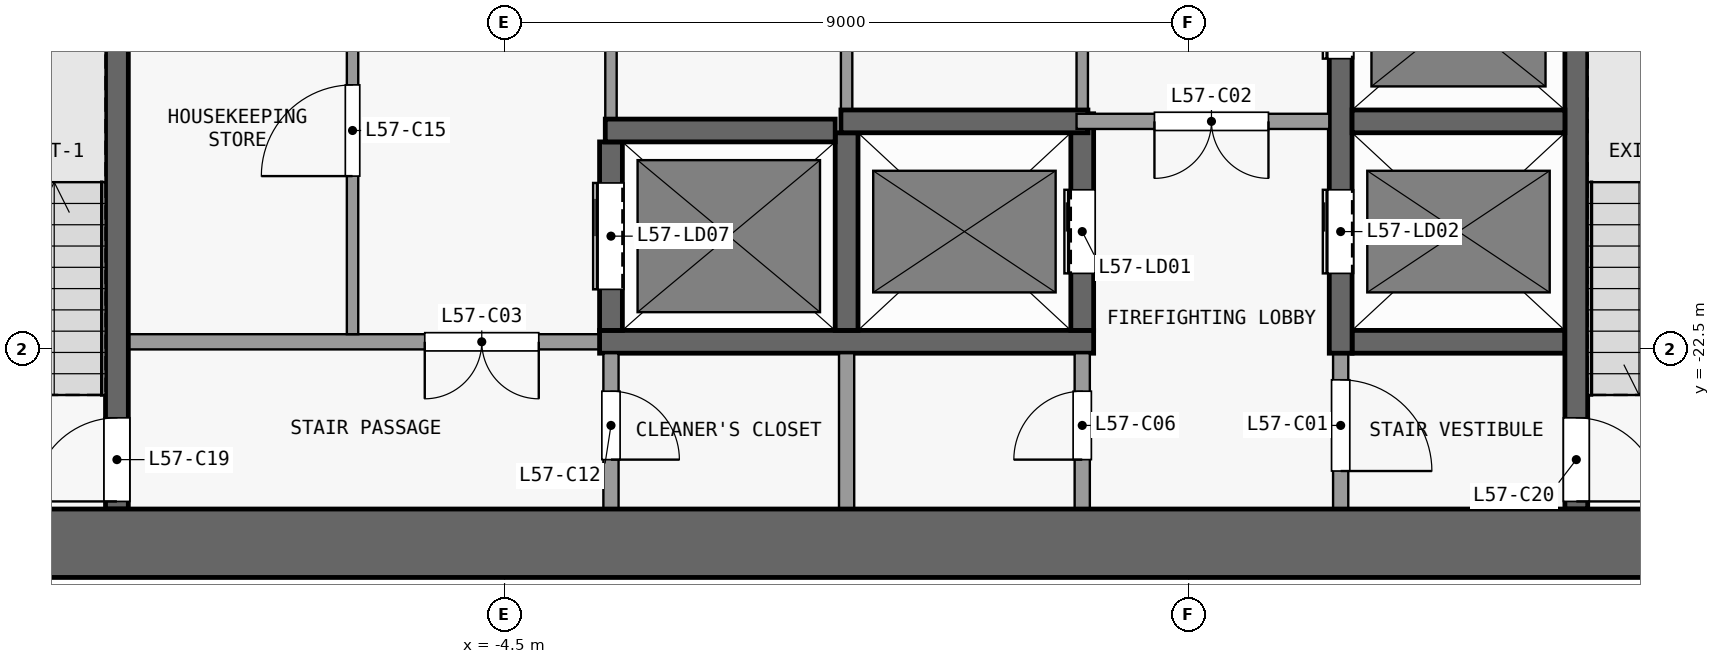
"""IFC4 building model, lengths in metres.
Left out: names, types, materials, properties, quantities, classifications, styles, units other than length and angle.
Written with IfcOpenShell. Run it as: python <this file> out.ifc"""

import sys

from ifc_helpers import new_model, si_unit, direction, frame, frame_2d, origin, place, context, subcontext, project, spatial, rectangle, extrude, element, fill, save


model = new_model("IFC4")
c1 = context("Model", 3, precision=1e-05, world=origin(), true_north=direction((0.0, 1.0)))
c2 = subcontext(c1, "Body", "Model", "MODEL_VIEW")
j1 = project(units=[si_unit("LENGTHUNIT", "METRE"), si_unit("PLANEANGLEUNIT", "RADIAN")], contexts=[c1])
p1 = place(None, origin())
s1 = spatial("IfcSite", under=j1, at=p1, CompositionType="ELEMENT")
p2 = place(p1, origin())
s2 = spatial("IfcBuilding", under=s1, at=p2, CompositionType="ELEMENT")
p3 = place(p2, frame((0.0, 0.0, 226.7)))
s3 = spatial("IfcBuildingStorey", under=s2, at=p3, CompositionType="ELEMENT", Elevation=226.7)
p4 = place(p3, frame((-13.2, -25.05, 0.0), z_axis=(0.0, 0.0, 1.0), x_axis=(1.0, 0.0, 0.0)))
e1 = element("IfcWall", 1, at=p4, inside=s3, PredefinedType="SHEAR", context=c2, shape_type="SweptSolid", body=[
    extrude(rectangle(XDim=26.4, YDim=0.9, at=frame_2d((13.2, 0.0))), origin(), (0.0, 0.0, 1.0), 3.3),
])
p5 = place(p3, frame((-3.25, -22.4, 0.0), z_axis=(0.0, 0.0, 1.0), x_axis=(-1.0, 0.0, 0.0)))
e2 = element("IfcWall", 2, at=p5, inside=s3, PredefinedType="PARTITIONING", context=c2, shape_type="SweptSolid", body=[
    extrude(rectangle(XDim=6.2, YDim=0.2, at=frame_2d((3.1, 0.0))), origin(), (0.0, 0.0, 1.0), 3.3),
])
p6 = place(p5, frame((0.8, 0.0, 0.0)))
e3 = element("IfcOpeningElement", 3, at=p6, cuts=e2, PredefinedType="OPENING", context=c2, shape_type="SweptSolid", body=[
    extrude(rectangle(XDim=1.5, YDim=2.1, at=frame_2d((0.75, 1.05))), frame((0.0, 0.11, 0.0), z_axis=(0.0, -1.0, 0.0), x_axis=(1.0, 0.0, 0.0)), (0.0, 0.0, 1.0), 0.22),
])
p7 = place(p3, frame((-3.25, -22.4, 0.0), z_axis=(0.0, 0.0, 1.0), x_axis=(1.0, 0.0, 0.0)))
e4 = element("IfcWall", 4, at=p7, inside=s3, PredefinedType="SHEAR", context=c2, shape_type="SweptSolid", body=[
    extrude(rectangle(XDim=6.5, YDim=0.3, at=frame_2d((3.25, 0.0))), origin(), (0.0, 0.0, 1.0), 3.3),
])
p8 = place(p3, frame((6.65, -22.4, 0.0), z_axis=(0.0, 0.0, 1.0), x_axis=(1.0, 0.0, 0.0)))
e5 = element("IfcWall", 5, at=p8, inside=s3, PredefinedType="SHEAR", context=c2, shape_type="SweptSolid", body=[
    extrude(rectangle(XDim=2.8, YDim=0.3, at=frame_2d((1.4, 0.0))), origin(), (0.0, 0.0, 1.0), 3.3),
])
p9 = place(p3, frame((-3.175, -19.62, 0.0), z_axis=(0.0, 0.0, 1.0), x_axis=(1.0, 0.0, 0.0)))
e6 = element("IfcWall", 6, at=p9, inside=s3, PredefinedType="SHEAR", context=c2, shape_type="SweptSolid", body=[
    extrude(rectangle(XDim=3.025, YDim=0.3, at=frame_2d((1.513, 0.0))), origin(), (0.0, 0.0, 1.0), 3.3),
])
p10 = place(p3, frame((-0.075, -19.5, 0.0), z_axis=(0.0, 0.0, 1.0), x_axis=(1.0, 0.0, 0.0)))
e7 = element("IfcWall", 7, at=p10, inside=s3, PredefinedType="SHEAR", context=c2, shape_type="SweptSolid", body=[
    extrude(rectangle(XDim=3.25, YDim=0.3, at=frame_2d((1.625, 0.0))), origin(), (0.0, 0.0, 1.0), 3.3),
])
p11 = place(p3, frame((6.35, -19.5, 0.0), z_axis=(0.0, 0.0, 1.0), x_axis=(-1.0, 0.0, 0.0)))
e8 = element("IfcWall", 8, at=p11, inside=s3, PredefinedType="PARTITIONING", context=c2, shape_type="SweptSolid", body=[
    extrude(rectangle(XDim=3.325, YDim=0.2, at=frame_2d((1.663, 0.0))), origin(), (0.0, 0.0, 1.0), 3.3),
])
p12 = place(p11, frame((0.8, 0.0, 0.0)))
e9 = element("IfcOpeningElement", 9, at=p12, cuts=e8, PredefinedType="OPENING", context=c2, shape_type="SweptSolid", body=[
    extrude(rectangle(XDim=1.5, YDim=2.1, at=frame_2d((0.75, 1.05))), frame((0.0, 0.11, 0.0), z_axis=(0.0, -1.0, 0.0), x_axis=(1.0, 0.0, 0.0)), (0.0, 0.0, 1.0), 0.22),
])
p13 = place(p3, frame((6.65, -19.5, 0.0), z_axis=(0.0, 0.0, 1.0), x_axis=(1.0, 0.0, 0.0)))
e10 = element("IfcWall", 10, at=p13, inside=s3, PredefinedType="SHEAR", context=c2, shape_type="SweptSolid", body=[
    extrude(rectangle(XDim=2.8, YDim=0.3, at=frame_2d((1.4, 0.0))), origin(), (0.0, 0.0, 1.0), 3.3),
])
p14 = place(p3, frame((-9.6, -24.6, 0.0), z_axis=(0.0, 0.0, 1.0), x_axis=(0.0, 1.0, 0.0)))
e11 = element("IfcWall", 11, at=p14, inside=s3, PredefinedType="SHEAR", context=c2, shape_type="SweptSolid", body=[
    extrude(rectangle(XDim=7.7, YDim=0.3, at=frame_2d((3.85, 0.0))), origin(), (0.0, 0.0, 1.0), 3.3),
])
p15 = place(p14, frame((0.1, 0.0, 0.0)))
e12 = element("IfcOpeningElement", 12, at=p15, cuts=e11, PredefinedType="OPENING", context=c2, shape_type="SweptSolid", body=[
    extrude(rectangle(XDim=1.1, YDim=2.1, at=frame_2d((0.55, 1.05))), frame((0.0, 0.16, 0.0), z_axis=(0.0, -1.0, 0.0), x_axis=(1.0, 0.0, 0.0)), (0.0, 0.0, 1.0), 0.32),
])
p16 = place(p3, frame((-6.5, -22.3, 0.0), z_axis=(0.0, 0.0, 1.0), x_axis=(0.0, 1.0, 0.0)))
e13 = element("IfcWall", 13, at=p16, inside=s3, PredefinedType="PARTITIONING", context=c2, shape_type="SweptSolid", body=[
    extrude(rectangle(XDim=8.14, YDim=0.15, at=frame_2d((4.07, 0.0))), origin(), (0.0, 0.0, 1.0), 3.3),
])
p17 = place(p16, frame((2.08, 0.0, 0.0)))
e14 = element("IfcOpeningElement", 14, at=p17, cuts=e13, PredefinedType="OPENING", context=c2, shape_type="SweptSolid", body=[
    extrude(rectangle(XDim=1.2, YDim=2.1, at=frame_2d((0.6, 1.05))), frame((0.0, 0.085, 0.0), z_axis=(0.0, -1.0, 0.0), x_axis=(1.0, 0.0, 0.0)), (0.0, 0.0, 1.0), 0.17),
])
p18 = place(p16, frame((6.4, 0.0, 0.0)))
e15 = element("IfcOpeningElement", 15, at=p18, cuts=e13, PredefinedType="OPENING", context=c2, shape_type="SweptSolid", body=[
    extrude(rectangle(XDim=0.9, YDim=2.1, at=frame_2d((0.45, 1.05))), frame((0.0, 0.085, 0.0), z_axis=(0.0, -1.0, 0.0), x_axis=(1.0, 0.0, 0.0)), (0.0, 0.0, 1.0), 0.17),
])
p19 = place(p3, frame((-3.1, -22.55, 0.0), z_axis=(0.0, 0.0, 1.0), x_axis=(0.0, -1.0, 0.0)))
e16 = element("IfcWall", 16, at=p19, inside=s3, PredefinedType="PARTITIONING", context=c2, shape_type="SweptSolid", body=[
    extrude(rectangle(XDim=2.05, YDim=0.2, at=frame_2d((1.025, 0.0))), origin(), (0.0, 0.0, 1.0), 3.3),
])
p20 = place(p19, frame((0.5, 0.0, 0.0)))
e17 = element("IfcOpeningElement", 17, at=p20, cuts=e16, PredefinedType="OPENING", context=c2, shape_type="SweptSolid", body=[
    extrude(rectangle(XDim=0.9, YDim=2.1, at=frame_2d((0.45, 1.05))), frame((0.0, 0.11, 0.0), z_axis=(0.0, -1.0, 0.0), x_axis=(1.0, 0.0, 0.0)), (0.0, 0.0, 1.0), 0.22),
])
p21 = place(p3, frame((-3.1, -22.25, 0.0), z_axis=(0.0, 0.0, 1.0), x_axis=(0.0, 1.0, 0.0)))
e18 = element("IfcWall", 18, at=p21, inside=s3, PredefinedType="SHEAR", context=c2, shape_type="SweptSolid", body=[
    extrude(rectangle(XDim=2.48, YDim=0.3, at=frame_2d((1.24, 0.0))), origin(), (0.0, 0.0, 1.0), 3.3),
])
p22 = place(p21, frame((0.54, 0.0, 0.0)))
e19 = element("IfcOpeningElement", 19, at=p22, cuts=e18, PredefinedType="OPENING", context=c2, shape_type="SweptSolid", body=[
    extrude(rectangle(XDim=1.4, YDim=2.1, at=frame_2d((0.7, 1.05))), frame((0.0, 0.16, 0.0), z_axis=(0.0, -1.0, 0.0), x_axis=(1.0, 0.0, 0.0)), (0.0, 0.0, 1.0), 0.32),
])
p23 = place(p3, frame((-3.1, -8.5, 0.0), z_axis=(0.0, 0.0, 1.0), x_axis=(0.0, -1.0, 0.0)))
e20 = element("IfcWall", 20, at=p23, inside=s3, PredefinedType="PARTITIONING", context=c2, shape_type="SweptSolid", body=[
    extrude(rectangle(XDim=10.97, YDim=0.15, at=frame_2d((5.485, 0.0))), origin(), (0.0, 0.0, 1.0), 3.3),
])
p24 = place(p23, frame((4.96, 0.0, 0.0)))
e21 = element("IfcOpeningElement", 21, at=p24, cuts=e20, PredefinedType="OPENING", context=c2, shape_type="SweptSolid", body=[
    extrude(rectangle(XDim=1.2, YDim=2.1, at=frame_2d((0.6, 1.05))), frame((0.0, 0.085, 0.0), z_axis=(0.0, -1.0, 0.0), x_axis=(1.0, 0.0, 0.0)), (0.0, 0.0, 1.0), 0.17),
])
p25 = place(p3, frame((0.0, -24.6, 0.0), z_axis=(0.0, 0.0, 1.0), x_axis=(0.0, 1.0, 0.0)))
e22 = element("IfcWall", 22, at=p25, inside=s3, PredefinedType="PARTITIONING", context=c2, shape_type="SweptSolid", body=[
    extrude(rectangle(XDim=2.05, YDim=0.2, at=frame_2d((1.025, 0.0))), origin(), (0.0, 0.0, 1.0), 3.3),
])
p26 = place(p3, frame((0.0, -22.25, 0.0), z_axis=(0.0, 0.0, 1.0), x_axis=(0.0, 1.0, 0.0)))
e23 = element("IfcWall", 23, at=p26, inside=s3, PredefinedType="SHEAR", context=c2, shape_type="SweptSolid", body=[
    extrude(rectangle(XDim=2.6, YDim=0.3, at=frame_2d((1.3, 0.0))), origin(), (0.0, 0.0, 1.0), 3.3),
])
p27 = place(p3, frame((0.0, -19.35, 0.0), z_axis=(0.0, 0.0, 1.0), x_axis=(0.0, 1.0, 0.0)))
e24 = element("IfcWall", 24, at=p27, inside=s3, PredefinedType="PARTITIONING", context=c2, shape_type="SweptSolid", body=[
    extrude(rectangle(XDim=10.85, YDim=0.15, at=frame_2d((5.425, 0.0))), origin(), (0.0, 0.0, 1.0), 3.3),
])
p28 = place(p3, frame((3.1, -24.6, 0.0), z_axis=(0.0, 0.0, 1.0), x_axis=(0.0, 1.0, 0.0)))
e25 = element("IfcWall", 25, at=p28, inside=s3, PredefinedType="PARTITIONING", context=c2, shape_type="SweptSolid", body=[
    extrude(rectangle(XDim=2.05, YDim=0.2, at=frame_2d((1.025, 0.0))), origin(), (0.0, 0.0, 1.0), 3.3),
])
p29 = place(p28, frame((0.65, 0.0, 0.0)))
e26 = element("IfcOpeningElement", 26, at=p29, cuts=e25, PredefinedType="OPENING", context=c2, shape_type="SweptSolid", body=[
    extrude(rectangle(XDim=0.9, YDim=2.1, at=frame_2d((0.45, 1.05))), frame((0.0, 0.11, 0.0), z_axis=(0.0, -1.0, 0.0), x_axis=(1.0, 0.0, 0.0)), (0.0, 0.0, 1.0), 0.22),
])
p30 = place(p3, frame((3.1, -22.25, 0.0), z_axis=(0.0, 0.0, 1.0), x_axis=(0.0, 1.0, 0.0)))
e27 = element("IfcWall", 27, at=p30, inside=s3, PredefinedType="SHEAR", context=c2, shape_type="SweptSolid", body=[
    extrude(rectangle(XDim=2.85, YDim=0.3, at=frame_2d((1.425, 0.0))), origin(), (0.0, 0.0, 1.0), 3.3),
])
p31 = place(p30, frame((0.75, 0.0, 0.0)))
e28 = element("IfcOpeningElement", 28, at=p31, cuts=e27, PredefinedType="OPENING", context=c2, shape_type="SweptSolid", body=[
    extrude(rectangle(XDim=1.1, YDim=2.1, at=frame_2d((0.55, 1.05))), frame((0.0, 0.16, 0.0), z_axis=(0.0, -1.0, 0.0), x_axis=(1.0, 0.0, 0.0)), (0.0, 0.0, 1.0), 0.32),
])
p32 = place(p3, frame((3.1, -19.4, 0.0), z_axis=(0.0, 0.0, 1.0), x_axis=(0.0, 1.0, 0.0)))
e29 = element("IfcWall", 29, at=p32, inside=s3, PredefinedType="PARTITIONING", context=c2, shape_type="SweptSolid", body=[
    extrude(rectangle(XDim=10.9, YDim=0.15, at=frame_2d((5.45, 0.0))), origin(), (0.0, 0.0, 1.0), 3.3),
])
p33 = place(p32, frame((4.8, 0.0, 0.0)))
e30 = element("IfcOpeningElement", 30, at=p33, cuts=e29, PredefinedType="OPENING", context=c2, shape_type="SweptSolid", body=[
    extrude(rectangle(XDim=1.2, YDim=2.1, at=frame_2d((0.6, 1.05))), frame((0.0, 0.085, 0.0), z_axis=(0.0, -1.0, 0.0), x_axis=(1.0, 0.0, 0.0)), (0.0, 0.0, 1.0), 0.17),
])
p34 = place(p3, frame((6.5, -22.55, 0.0), z_axis=(0.0, 0.0, 1.0), x_axis=(0.0, -1.0, 0.0)))
e31 = element("IfcWall", 31, at=p34, inside=s3, PredefinedType="PARTITIONING", context=c2, shape_type="SweptSolid", body=[
    extrude(rectangle(XDim=2.05, YDim=0.2, at=frame_2d((1.025, 0.0))), origin(), (0.0, 0.0, 1.0), 3.3),
])
p35 = place(p34, frame((0.35, 0.0, 0.0)))
e32 = element("IfcOpeningElement", 32, at=p35, cuts=e31, PredefinedType="OPENING", context=c2, shape_type="SweptSolid", body=[
    extrude(rectangle(XDim=1.2, YDim=2.1, at=frame_2d((0.6, 1.05))), frame((0.0, 0.11, 0.0), z_axis=(0.0, -1.0, 0.0), x_axis=(1.0, 0.0, 0.0)), (0.0, 0.0, 1.0), 0.22),
])
p36 = place(p3, frame((6.5, -22.55, 0.0), z_axis=(0.0, 0.0, 1.0), x_axis=(0.0, 1.0, 0.0)))
e33 = element("IfcWall", 33, at=p36, inside=s3, PredefinedType="SHEAR", context=c2, shape_type="SweptSolid", body=[
    extrude(rectangle(XDim=14.05, YDim=0.3, at=frame_2d((7.025, 0.0))), origin(), (0.0, 0.0, 1.0), 3.3),
])
p37 = place(p36, frame((1.05, 0.0, 0.0)))
e34 = element("IfcOpeningElement", 34, at=p37, cuts=e33, PredefinedType="OPENING", context=c2, shape_type="SweptSolid", body=[
    extrude(rectangle(XDim=1.1, YDim=2.1, at=frame_2d((0.55, 1.05))), frame((0.0, 0.16, 0.0), z_axis=(0.0, -1.0, 0.0), x_axis=(1.0, 0.0, 0.0)), (0.0, 0.0, 1.0), 0.32),
])
p38 = place(p36, frame((3.875, 0.0, 0.0)))
e35 = element("IfcOpeningElement", 35, at=p38, cuts=e33, PredefinedType="OPENING", context=c2, shape_type="SweptSolid", body=[
    extrude(rectangle(XDim=1.1, YDim=2.1, at=frame_2d((0.55, 1.05))), frame((0.0, 0.16, 0.0), z_axis=(0.0, -1.0, 0.0), x_axis=(1.0, 0.0, 0.0)), (0.0, 0.0, 1.0), 0.32),
])
p39 = place(p36, frame((6.625, 0.0, 0.0)))
e36 = element("IfcOpeningElement", 36, at=p39, cuts=e33, PredefinedType="OPENING", context=c2, shape_type="SweptSolid", body=[
    extrude(rectangle(XDim=1.1, YDim=2.1, at=frame_2d((0.55, 1.05))), frame((0.0, 0.16, 0.0), z_axis=(0.0, -1.0, 0.0), x_axis=(1.0, 0.0, 0.0)), (0.0, 0.0, 1.0), 0.32),
])
p40 = place(p36, frame((9.375, 0.0, 0.0)))
e37 = element("IfcOpeningElement", 37, at=p40, cuts=e33, PredefinedType="OPENING", context=c2, shape_type="SweptSolid", body=[
    extrude(rectangle(XDim=1.1, YDim=2.1, at=frame_2d((0.55, 1.05))), frame((0.0, 0.16, 0.0), z_axis=(0.0, -1.0, 0.0), x_axis=(1.0, 0.0, 0.0)), (0.0, 0.0, 1.0), 0.32),
])
p41 = place(p36, frame((12.125, 0.0, 0.0)))
e38 = element("IfcOpeningElement", 38, at=p41, cuts=e33, PredefinedType="OPENING", context=c2, shape_type="SweptSolid", body=[
    extrude(rectangle(XDim=1.1, YDim=2.1, at=frame_2d((0.55, 1.05))), frame((0.0, 0.16, 0.0), z_axis=(0.0, -1.0, 0.0), x_axis=(1.0, 0.0, 0.0)), (0.0, 0.0, 1.0), 0.32),
])
p42 = place(p3, frame((9.6, -16.9, 0.0), z_axis=(0.0, 0.0, 1.0), x_axis=(0.0, -1.0, 0.0)))
e39 = element("IfcWall", 39, at=p42, inside=s3, PredefinedType="SHEAR", context=c2, shape_type="SweptSolid", body=[
    extrude(rectangle(XDim=7.7, YDim=0.3, at=frame_2d((3.85, 0.0))), origin(), (0.0, 0.0, 1.0), 3.3),
])
p43 = place(p42, frame((6.5, 0.0, 0.0)))
e40 = element("IfcOpeningElement", 40, at=p43, cuts=e39, PredefinedType="OPENING", context=c2, shape_type="SweptSolid", body=[
    extrude(rectangle(XDim=1.1, YDim=2.1, at=frame_2d((0.55, 1.05))), frame((0.0, 0.16, 0.0), z_axis=(0.0, -1.0, 0.0), x_axis=(1.0, 0.0, 0.0)), (0.0, 0.0, 1.0), 0.32),
])
p44 = place(p31, origin())
e41 = element("IfcDoor", 41, at=p44, inside=s3, OperationType="DOUBLE_DOOR_SLIDING", PredefinedType="DOOR", context=c2, shape_type="SweptSolid", body=[
    extrude(rectangle(XDim=1.1, YDim=2.1, at=frame_2d((0.55, 1.05))), frame((0.0, 0.025, 0.0), z_axis=(0.0, -1.0, 0.0), x_axis=(1.0, 0.0, 0.0)), (0.0, 0.0, 1.0), 0.05),
])
fill(e28, e41)
p45 = place(p37, origin())
e42 = element("IfcDoor", 42, at=p45, inside=s3, OperationType="DOUBLE_DOOR_SLIDING", PredefinedType="DOOR", context=c2, shape_type="SweptSolid", body=[
    extrude(rectangle(XDim=1.1, YDim=2.1, at=frame_2d((0.55, 1.05))), frame((0.0, 0.025, 0.0), z_axis=(0.0, -1.0, 0.0), x_axis=(1.0, 0.0, 0.0)), (0.0, 0.0, 1.0), 0.05),
])
fill(e34, e42)
p46 = place(p38, origin())
e43 = element("IfcDoor", 43, at=p46, inside=s3, OperationType="DOUBLE_DOOR_SLIDING", PredefinedType="DOOR", context=c2, shape_type="SweptSolid", body=[
    extrude(rectangle(XDim=1.1, YDim=2.1, at=frame_2d((0.55, 1.05))), frame((0.0, 0.025, 0.0), z_axis=(0.0, -1.0, 0.0), x_axis=(1.0, 0.0, 0.0)), (0.0, 0.0, 1.0), 0.05),
])
fill(e35, e43)
p47 = place(p22, origin())
e44 = element("IfcDoor", 44, at=p47, inside=s3, OperationType="DOUBLE_DOOR_SLIDING", PredefinedType="DOOR", context=c2, shape_type="SweptSolid", body=[
    extrude(rectangle(XDim=1.4, YDim=2.1, at=frame_2d((0.7, 1.05))), frame((0.0, 0.025, 0.0), z_axis=(0.0, -1.0, 0.0), x_axis=(1.0, 0.0, 0.0)), (0.0, 0.0, 1.0), 0.05),
])
fill(e19, e44)
p48 = place(p35, origin())
e45 = element("IfcDoor", 45, at=p48, inside=s3, OperationType="SINGLE_SWING_RIGHT", PredefinedType="DOOR", context=c2, shape_type="SweptSolid", body=[
    extrude(rectangle(XDim=1.2, YDim=2.1, at=frame_2d((0.6, 1.05))), frame((0.0, 0.025, 0.0), z_axis=(0.0, -1.0, 0.0), x_axis=(1.0, 0.0, 0.0)), (0.0, 0.0, 1.0), 0.05),
])
fill(e32, e45)
p49 = place(p12, origin())
e46 = element("IfcDoor", 46, at=p49, inside=s3, OperationType="DOUBLE_DOOR_SINGLE_SWING", PredefinedType="DOOR", context=c2, shape_type="SweptSolid", body=[
    extrude(rectangle(XDim=1.5, YDim=2.1, at=frame_2d((0.75, 1.05))), frame((0.0, 0.025, 0.0), z_axis=(0.0, -1.0, 0.0), x_axis=(1.0, 0.0, 0.0)), (0.0, 0.0, 1.0), 0.05),
])
fill(e9, e46)
p50 = place(p6, origin())
e47 = element("IfcDoor", 47, at=p50, inside=s3, OperationType="DOUBLE_DOOR_SINGLE_SWING", PredefinedType="DOOR", context=c2, shape_type="SweptSolid", body=[
    extrude(rectangle(XDim=1.5, YDim=2.1, at=frame_2d((0.75, 1.05))), frame((0.0, 0.025, 0.0), z_axis=(0.0, -1.0, 0.0), x_axis=(1.0, 0.0, 0.0)), (0.0, 0.0, 1.0), 0.05),
])
fill(e3, e47)
p51 = place(p29, origin())
e48 = element("IfcDoor", 48, at=p51, inside=s3, OperationType="SINGLE_SWING_LEFT", PredefinedType="DOOR", context=c2, shape_type="SweptSolid", body=[
    extrude(rectangle(XDim=0.9, YDim=2.1, at=frame_2d((0.45, 1.05))), frame((0.0, 0.025, 0.0), z_axis=(0.0, -1.0, 0.0), x_axis=(1.0, 0.0, 0.0)), (0.0, 0.0, 1.0), 0.05),
])
fill(e26, e48)
p52 = place(p20, origin())
e49 = element("IfcDoor", 49, at=p52, inside=s3, OperationType="SINGLE_SWING_RIGHT", PredefinedType="DOOR", context=c2, shape_type="SweptSolid", body=[
    extrude(rectangle(XDim=0.9, YDim=2.1, at=frame_2d((0.45, 1.05))), frame((0.0, 0.025, 0.0), z_axis=(0.0, -1.0, 0.0), x_axis=(1.0, 0.0, 0.0)), (0.0, 0.0, 1.0), 0.05),
])
fill(e17, e49)
p53 = place(p17, origin())
e50 = element("IfcDoor", 50, at=p53, inside=s3, OperationType="SINGLE_SWING_LEFT", PredefinedType="DOOR", context=c2, shape_type="SweptSolid", body=[
    extrude(rectangle(XDim=1.2, YDim=2.1, at=frame_2d((0.6, 1.05))), frame((0.0, 0.025, 0.0), z_axis=(0.0, -1.0, 0.0), x_axis=(1.0, 0.0, 0.0)), (0.0, 0.0, 1.0), 0.05),
])
fill(e14, e50)
p54 = place(p15, origin())
e51 = element("IfcDoor", 51, at=p54, inside=s3, OperationType="SINGLE_SWING_LEFT", PredefinedType="DOOR", context=c2, shape_type="SweptSolid", body=[
    extrude(rectangle(XDim=1.1, YDim=2.1, at=frame_2d((0.55, 1.05))), frame((0.0, 0.025, 0.0), z_axis=(0.0, -1.0, 0.0), x_axis=(1.0, 0.0, 0.0)), (0.0, 0.0, 1.0), 0.05),
])
fill(e12, e51)
p55 = place(p43, origin())
e52 = element("IfcDoor", 52, at=p55, inside=s3, OperationType="SINGLE_SWING_RIGHT", PredefinedType="DOOR", context=c2, shape_type="SweptSolid", body=[
    extrude(rectangle(XDim=1.1, YDim=2.1, at=frame_2d((0.55, 1.05))), frame((0.0, 0.025, 0.0), z_axis=(0.0, -1.0, 0.0), x_axis=(1.0, 0.0, 0.0)), (0.0, 0.0, 1.0), 0.05),
])
fill(e40, e52)
save(model, sys.argv[1])
